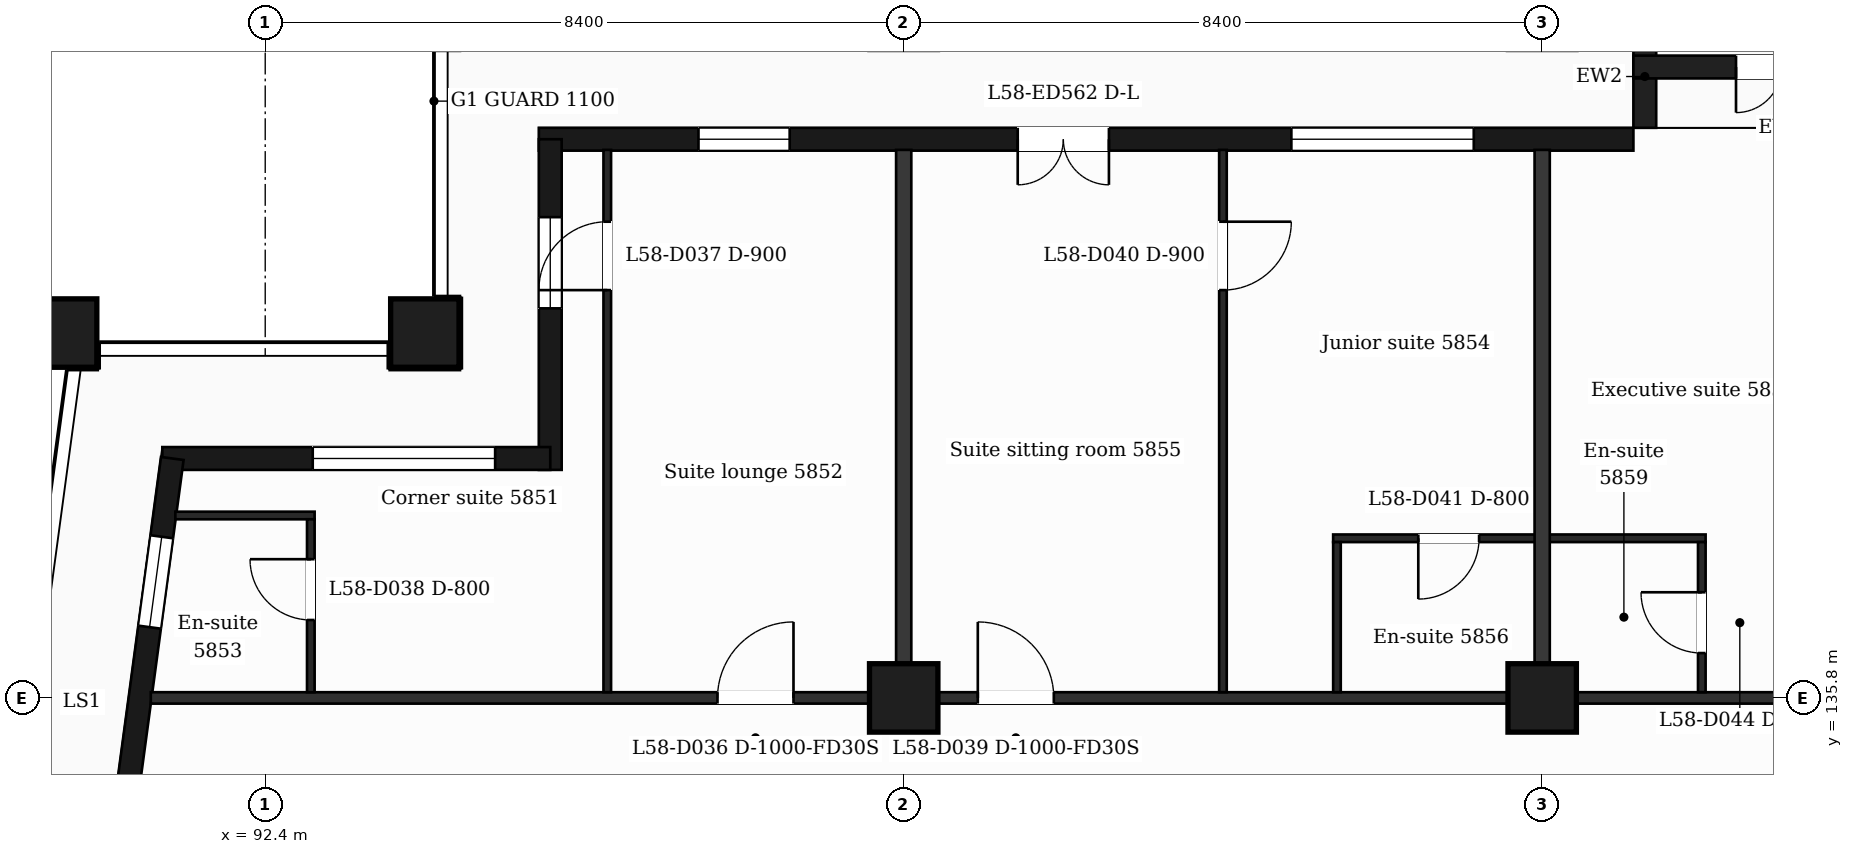
"""IFC4 building model, lengths in metres.
Left out: names, types, materials, properties, quantities, classifications, styles, units other than length and angle.
Written with IfcOpenShell. Run it as: python <this file> out.ifc"""

import sys

from ifc_helpers import new_model, si_unit, direction, frame, frame_2d, origin, origin_2d, place, context, subcontext, project, spatial, rectangle, extrude, element, fill, save


model = new_model("IFC4")
c1 = context("Model", 3, precision=1e-05, world=origin(), true_north=direction((0.0, 1.0)))
c2 = subcontext(c1, "Body", "Model", "MODEL_VIEW")
j1 = project(units=[si_unit("LENGTHUNIT", "METRE"), si_unit("PLANEANGLEUNIT", "RADIAN")], contexts=[c1])
p1 = place(None, origin())
s1 = spatial("IfcSite", under=j1, at=p1, CompositionType="ELEMENT")
p2 = place(p1, origin())
s2 = spatial("IfcBuilding", under=s1, at=p2, CompositionType="ELEMENT")
p3 = place(p2, frame((0.0, 0.0, 239.2)))
s3 = spatial("IfcBuildingStorey", under=s2, at=p3, CompositionType="ELEMENT", Elevation=239.2)
for number, where, z_axis, x_axis in (
    (1, (94.5, 140.6, 0.0), (0.0, 0.0, 1.0), (1.0, 0.0, 0.0)),
    (2, (89.735, 140.6, 0.0), (0.0, 0.0, 1.0), (1.0, 0.0, 0.0)),
    (3, (100.8, 135.8, 0.0), (0.0, 0.0, 1.0), (1.0, 0.0, 0.0)),
    (4, (109.2, 135.8, 0.0), (0.0, 0.0, 1.0), (1.0, 0.0, 0.0)),
):
    element("IfcColumn", number, at=place(p3, frame(where, z_axis=z_axis, x_axis=x_axis)), inside=s3, PredefinedType="COLUMN", context=c2, shape_type="SweptSolid", body=[
        extrude(rectangle(XDim=0.9, YDim=0.9, at=origin_2d()), origin(), (0.0, 0.0, 1.0), 3.7),
    ])
p4 = place(p3, frame((110.4, 143.15, 0.0), z_axis=(0.0, 0.0, 1.0), x_axis=(-1.0, 0.0, 0.0)))
e5 = element("IfcWall", 5, at=p4, inside=s3, PredefinedType="SOLIDWALL", context=c2, shape_type="SweptSolid", body=[
    extrude(rectangle(XDim=14.4, YDim=0.3, at=frame_2d((7.2, 0.0))), origin(), (0.0, 0.0, 1.0), 3.38),
])
p5 = place(p4, frame((2.1, 0.0, 0.9)))
e6 = element("IfcOpeningElement", 6, at=p5, cuts=e5, PredefinedType="OPENING", context=c2, shape_type="SweptSolid", body=[
    extrude(rectangle(XDim=2.4, YDim=2.1, at=frame_2d((1.2, 1.05))), frame((0.0, 0.16, 0.0), z_axis=(0.0, -1.0, 0.0), x_axis=(1.0, 0.0, 0.0)), (0.0, 0.0, 1.0), 0.32),
])
p6 = place(p4, frame((6.9, 0.0, 0.0)))
e7 = element("IfcOpeningElement", 7, at=p6, cuts=e5, PredefinedType="OPENING", context=c2, shape_type="SweptSolid", body=[
    extrude(rectangle(XDim=1.2, YDim=2.4, at=frame_2d((0.6, 1.2))), frame((0.0, 0.16, 0.0), z_axis=(0.0, -1.0, 0.0), x_axis=(1.0, 0.0, 0.0)), (0.0, 0.0, 1.0), 0.32),
])
p7 = place(p4, frame((11.1, 0.0, 0.9)))
e8 = element("IfcOpeningElement", 8, at=p7, cuts=e5, PredefinedType="OPENING", context=c2, shape_type="SweptSolid", body=[
    extrude(rectangle(XDim=1.2, YDim=2.1, at=frame_2d((0.6, 1.05))), frame((0.0, 0.16, 0.0), z_axis=(0.0, -1.0, 0.0), x_axis=(1.0, 0.0, 0.0)), (0.0, 0.0, 1.0), 0.32),
])
p8 = place(p3, frame((110.55, 143.3, 0.0), z_axis=(0.0, 0.0, 1.0), x_axis=(0.0, 1.0, 0.0)))
e9 = element("IfcWall", 9, at=p8, inside=s3, PredefinedType="SOLIDWALL", context=c2, shape_type="SweptSolid", body=[
    extrude(rectangle(XDim=1.35, YDim=0.3, at=frame_2d((0.675, 0.0))), origin(), (0.0, 0.0, 1.0), 3.38),
])
p9 = place(p3, frame((114.3, 144.1, 0.0), z_axis=(0.0, 0.0, 1.0), x_axis=(-1.0, 0.0, 0.0)))
e10 = element("IfcWall", 10, at=p9, inside=s3, PredefinedType="SOLIDWALL", context=c2, shape_type="SweptSolid", body=[
    extrude(rectangle(XDim=3.9, YDim=0.3, at=frame_2d((1.95, 0.0))), origin(), (0.0, 0.0, 1.0), 3.38),
])
p10 = place(p9, frame((1.35, 0.0, 0.0)))
e11 = element("IfcOpeningElement", 11, at=p10, cuts=e10, PredefinedType="OPENING", context=c2, shape_type="SweptSolid", body=[
    extrude(rectangle(XDim=1.2, YDim=2.4, at=frame_2d((0.6, 1.2))), frame((0.0, 0.16, 0.0), z_axis=(0.0, -1.0, 0.0), x_axis=(1.0, 0.0, 0.0)), (0.0, 0.0, 1.0), 0.32),
])
p11 = place(p3, frame((96.15, 143.15, 0.0), z_axis=(0.0, 0.0, 1.0), x_axis=(0.0, -1.0, 0.0)))
e12 = element("IfcWall", 12, at=p11, inside=s3, PredefinedType="SOLIDWALL", context=c2, shape_type="SweptSolid", body=[
    extrude(rectangle(XDim=4.35, YDim=0.3, at=frame_2d((2.175, 0.0))), origin(), (0.0, 0.0, 1.0), 3.38),
])
p12 = place(p11, frame((1.025, 0.0, 0.9)))
e13 = element("IfcOpeningElement", 13, at=p12, cuts=e12, PredefinedType="OPENING", context=c2, shape_type="SweptSolid", body=[
    extrude(rectangle(XDim=1.2, YDim=2.1, at=frame_2d((0.6, 1.05))), frame((0.0, 0.16, 0.0), z_axis=(0.0, -1.0, 0.0), x_axis=(1.0, 0.0, 0.0)), (0.0, 0.0, 1.0), 0.32),
])
p13 = place(p3, frame((96.15, 138.95, 0.0), z_axis=(0.0, 0.0, 1.0), x_axis=(-1.0, 0.0, 0.0)))
e14 = element("IfcWall", 14, at=p13, inside=s3, PredefinedType="SOLIDWALL", context=c2, shape_type="SweptSolid", body=[
    extrude(rectangle(XDim=5.104, YDim=0.3, at=frame_2d((2.552, 0.0))), origin(), (0.0, 0.0, 1.0), 3.38),
])
p14 = place(p13, frame((0.725, 0.0, 0.9)))
e15 = element("IfcOpeningElement", 15, at=p14, cuts=e14, PredefinedType="OPENING", context=c2, shape_type="SweptSolid", body=[
    extrude(rectangle(XDim=2.4, YDim=2.1, at=frame_2d((1.2, 1.05))), frame((0.0, 0.16, 0.0), z_axis=(0.0, -1.0, 0.0), x_axis=(1.0, 0.0, 0.0)), (0.0, 0.0, 1.0), 0.32),
])
p15 = place(p3, frame((91.177, 138.95, 0.0), z_axis=(0.0, 0.0, 1.0), x_axis=(-0.133426664613, -0.991058689065, 0.0)))
e16 = element("IfcWall", 16, at=p15, inside=s3, PredefinedType="SOLIDWALL", context=c2, shape_type="SweptSolid", body=[
    extrude(rectangle(XDim=6.609, YDim=0.3, at=frame_2d((3.305, 0.0))), origin(), (0.0, 0.0, 1.0), 3.38),
])
p16 = place(p15, frame((1.039, 0.0, 0.9)))
e17 = element("IfcOpeningElement", 17, at=p16, cuts=e16, PredefinedType="OPENING", context=c2, shape_type="SweptSolid", body=[
    extrude(rectangle(XDim=1.2, YDim=2.1, at=frame_2d((0.6, 1.05))), frame((0.0, 0.16, 0.0), z_axis=(0.0, -1.0, 0.0), x_axis=(1.0, 0.0, 0.0)), (0.0, 0.0, 1.0), 0.32),
])
p17 = place(p15, frame((4.294, 0.0, 0.0)))
e18 = element("IfcOpeningElement", 18, at=p17, cuts=e16, PredefinedType="OPENING", context=c2, shape_type="SweptSolid", body=[
    extrude(rectangle(XDim=1.2, YDim=2.4, at=frame_2d((0.6, 1.2))), frame((0.0, 0.16, 0.0), z_axis=(0.0, -1.0, 0.0), x_axis=(1.0, 0.0, 0.0)), (0.0, 0.0, 1.0), 0.32),
])
p18 = place(p3, frame((90.895, 135.8, 0.0), z_axis=(0.0, 0.0, 1.0), x_axis=(1.0, 0.0, 0.0)))
e19 = element("IfcWall", 19, at=p18, inside=s3, PredefinedType="PARTITIONING", context=c2, shape_type="SweptSolid", body=[
    extrude(rectangle(XDim=45.011, YDim=0.15, at=frame_2d((22.505, 0.0))), origin(), (0.0, 0.0, 1.0), 3.38),
])
p19 = place(p18, frame((7.455, 0.0, 0.0)))
e20 = element("IfcOpeningElement", 20, at=p19, cuts=e19, PredefinedType="OPENING", context=c2, shape_type="SweptSolid", body=[
    extrude(rectangle(XDim=1.0, YDim=2.1, at=frame_2d((0.5, 1.05))), frame((0.0, 0.085, 0.0), z_axis=(0.0, -1.0, 0.0), x_axis=(1.0, 0.0, 0.0)), (0.0, 0.0, 1.0), 0.17),
])
p20 = place(p18, frame((10.88, 0.0, 0.0)))
e21 = element("IfcOpeningElement", 21, at=p20, cuts=e19, PredefinedType="OPENING", context=c2, shape_type="SweptSolid", body=[
    extrude(rectangle(XDim=1.0, YDim=2.1, at=frame_2d((0.5, 1.05))), frame((0.0, 0.085, 0.0), z_axis=(0.0, -1.0, 0.0), x_axis=(1.0, 0.0, 0.0)), (0.0, 0.0, 1.0), 0.17),
])
p21 = place(p18, frame((27.88, 0.0, 0.0)))
e22 = element("IfcOpeningElement", 22, at=p21, cuts=e19, PredefinedType="OPENING", context=c2, shape_type="SweptSolid", body=[
    extrude(rectangle(XDim=1.0, YDim=2.1, at=frame_2d((0.5, 1.05))), frame((0.0, 0.085, 0.0), z_axis=(0.0, -1.0, 0.0), x_axis=(1.0, 0.0, 0.0)), (0.0, 0.0, 1.0), 0.17),
])
p22 = place(p18, frame((33.168, 0.0, 0.0)))
e23 = element("IfcOpeningElement", 23, at=p22, cuts=e19, PredefinedType="OPENING", context=c2, shape_type="SweptSolid", body=[
    extrude(rectangle(XDim=0.95, YDim=2.1, at=frame_2d((0.475, 1.05))), frame((0.0, 0.085, 0.0), z_axis=(0.0, -1.0, 0.0), x_axis=(1.0, 0.0, 0.0)), (0.0, 0.0, 1.0), 0.17),
])
p23 = place(p18, frame((37.255, 0.0, 0.0)))
e24 = element("IfcOpeningElement", 24, at=p23, cuts=e19, PredefinedType="OPENING", context=c2, shape_type="SweptSolid", body=[
    extrude(rectangle(XDim=1.0, YDim=2.1, at=frame_2d((0.5, 1.05))), frame((0.0, 0.085, 0.0), z_axis=(0.0, -1.0, 0.0), x_axis=(1.0, 0.0, 0.0)), (0.0, 0.0, 1.0), 0.17),
])
p24 = place(p3, frame((106.45, 137.9, 0.0), z_axis=(0.0, 0.0, 1.0), x_axis=(1.0, 0.0, 0.0)))
e25 = element("IfcWall", 25, at=p24, inside=s3, PredefinedType="PARTITIONING", context=c2, shape_type="SweptSolid", body=[
    extrude(rectangle(XDim=4.9, YDim=0.1, at=frame_2d((2.45, 0.0))), origin(), (0.0, 0.0, 1.0), 3.38),
])
p25 = place(p24, frame((1.12, 0.0, 0.0)))
e26 = element("IfcOpeningElement", 26, at=p25, cuts=e25, PredefinedType="OPENING", context=c2, shape_type="SweptSolid", body=[
    extrude(rectangle(XDim=0.8, YDim=2.1, at=frame_2d((0.4, 1.05))), frame((0.0, 0.06, 0.0), z_axis=(0.0, -1.0, 0.0), x_axis=(1.0, 0.0, 0.0)), (0.0, 0.0, 1.0), 0.12),
])
p26 = place(p3, frame((91.218, 138.2, 0.0), z_axis=(0.0, 0.0, 1.0), x_axis=(1.0, 0.0, 0.0)))
e27 = element("IfcWall", 27, at=p26, inside=s3, PredefinedType="PARTITIONING", context=c2, shape_type="SweptSolid", body=[
    extrude(rectangle(XDim=1.832, YDim=0.1, at=frame_2d((0.916, 0.0))), origin(), (0.0, 0.0, 1.0), 3.38),
])
p27 = place(p3, frame((93.0, 135.875, 0.0), z_axis=(0.0, 0.0, 1.0), x_axis=(0.0, 1.0, 0.0)))
e28 = element("IfcWall", 28, at=p27, inside=s3, PredefinedType="PARTITIONING", context=c2, shape_type="SweptSolid", body=[
    extrude(rectangle(XDim=2.275, YDim=0.1, at=frame_2d((1.137, 0.0))), origin(), (0.0, 0.0, 1.0), 3.38),
])
p28 = place(p27, frame((0.95, 0.0, 0.0)))
e29 = element("IfcOpeningElement", 29, at=p28, cuts=e28, PredefinedType="OPENING", context=c2, shape_type="SweptSolid", body=[
    extrude(rectangle(XDim=0.8, YDim=2.1, at=frame_2d((0.4, 1.05))), frame((0.0, 0.06, 0.0), z_axis=(0.0, -1.0, 0.0), x_axis=(1.0, 0.0, 0.0)), (0.0, 0.0, 1.0), 0.12),
])
p29 = place(p3, frame((96.9, 135.875, 0.0), z_axis=(0.0, 0.0, 1.0), x_axis=(0.0, 1.0, 0.0)))
e30 = element("IfcWall", 30, at=p29, inside=s3, PredefinedType="PARTITIONING", context=c2, shape_type="SweptSolid", body=[
    extrude(rectangle(XDim=7.135, YDim=0.1, at=frame_2d((3.567, 0.0))), origin(), (0.0, 0.0, 1.0), 3.38),
])
p30 = place(p29, frame((5.29, 0.0, 0.0)))
e31 = element("IfcOpeningElement", 31, at=p30, cuts=e30, PredefinedType="OPENING", context=c2, shape_type="SweptSolid", body=[
    extrude(rectangle(XDim=0.9, YDim=2.1, at=frame_2d((0.45, 1.05))), frame((0.0, 0.06, 0.0), z_axis=(0.0, -1.0, 0.0), x_axis=(1.0, 0.0, 0.0)), (0.0, 0.0, 1.0), 0.12),
])
p31 = place(p3, frame((100.8, 135.875, 0.0), z_axis=(0.0, 0.0, 1.0), x_axis=(0.0, 1.0, 0.0)))
e32 = element("IfcWall", 32, at=p31, inside=s3, PredefinedType="PARTITIONING", context=c2, shape_type="SweptSolid", body=[
    extrude(rectangle(XDim=7.135, YDim=0.2, at=frame_2d((3.567, 0.0))), origin(), (0.0, 0.0, 1.0), 3.38),
])
p32 = place(p3, frame((105.0, 135.875, 0.0), z_axis=(0.0, 0.0, 1.0), x_axis=(0.0, 1.0, 0.0)))
e33 = element("IfcWall", 33, at=p32, inside=s3, PredefinedType="PARTITIONING", context=c2, shape_type="SweptSolid", body=[
    extrude(rectangle(XDim=7.135, YDim=0.1, at=frame_2d((3.567, 0.0))), origin(), (0.0, 0.0, 1.0), 3.38),
])
p33 = place(p32, frame((5.29, 0.0, 0.0)))
e34 = element("IfcOpeningElement", 34, at=p33, cuts=e33, PredefinedType="OPENING", context=c2, shape_type="SweptSolid", body=[
    extrude(rectangle(XDim=0.9, YDim=2.1, at=frame_2d((0.45, 1.05))), frame((0.0, 0.06, 0.0), z_axis=(0.0, -1.0, 0.0), x_axis=(1.0, 0.0, 0.0)), (0.0, 0.0, 1.0), 0.12),
])
p34 = place(p3, frame((106.5, 135.875, 0.0), z_axis=(0.0, 0.0, 1.0), x_axis=(0.0, 1.0, 0.0)))
e35 = element("IfcWall", 35, at=p34, inside=s3, PredefinedType="PARTITIONING", context=c2, shape_type="SweptSolid", body=[
    extrude(rectangle(XDim=1.975, YDim=0.1, at=frame_2d((0.988, 0.0))), origin(), (0.0, 0.0, 1.0), 3.38),
])
p35 = place(p3, frame((109.2, 135.875, 0.0), z_axis=(0.0, 0.0, 1.0), x_axis=(0.0, 1.0, 0.0)))
e36 = element("IfcWall", 36, at=p35, inside=s3, PredefinedType="PARTITIONING", context=c2, shape_type="SweptSolid", body=[
    extrude(rectangle(XDim=7.135, YDim=0.2, at=frame_2d((3.567, 0.0))), origin(), (0.0, 0.0, 1.0), 3.38),
])
p36 = place(p3, frame((111.3, 135.875, 0.0), z_axis=(0.0, 0.0, 1.0), x_axis=(0.0, 1.0, 0.0)))
e37 = element("IfcWall", 37, at=p36, inside=s3, PredefinedType="PARTITIONING", context=c2, shape_type="SweptSolid", body=[
    extrude(rectangle(XDim=1.975, YDim=0.1, at=frame_2d((0.988, 0.0))), origin(), (0.0, 0.0, 1.0), 3.38),
])
p37 = place(p36, frame((0.515, 0.0, 0.0)))
e38 = element("IfcOpeningElement", 38, at=p37, cuts=e37, PredefinedType="OPENING", context=c2, shape_type="SweptSolid", body=[
    extrude(rectangle(XDim=0.8, YDim=2.1, at=frame_2d((0.4, 1.05))), frame((0.0, 0.06, 0.0), z_axis=(0.0, -1.0, 0.0), x_axis=(1.0, 0.0, 0.0)), (0.0, 0.0, 1.0), 0.12),
])
p38 = place(p5, origin())
e39 = element("IfcWindow", 39, at=p38, inside=s3, PartitioningType="SINGLE_PANEL", PredefinedType="WINDOW", context=c2, shape_type="SweptSolid", body=[
    extrude(rectangle(XDim=2.4, YDim=2.1, at=frame_2d((1.2, 1.05))), frame((0.0, 0.03, 0.0), z_axis=(0.0, -1.0, 0.0), x_axis=(1.0, 0.0, 0.0)), (0.0, 0.0, 1.0), 0.06),
])
fill(e6, e39)
p39 = place(p6, origin())
e40 = element("IfcDoor", 40, at=p39, inside=s3, OperationType="DOUBLE_DOOR_SINGLE_SWING", PredefinedType="DOOR", context=c2, shape_type="SweptSolid", body=[
    extrude(rectangle(XDim=1.2, YDim=2.4, at=frame_2d((0.6, 1.2))), frame((0.0, 0.025, 0.0), z_axis=(0.0, -1.0, 0.0), x_axis=(1.0, 0.0, 0.0)), (0.0, 0.0, 1.0), 0.05),
])
fill(e7, e40)
p40 = place(p7, origin())
e41 = element("IfcWindow", 41, at=p40, inside=s3, PartitioningType="SINGLE_PANEL", PredefinedType="WINDOW", context=c2, shape_type="SweptSolid", body=[
    extrude(rectangle(XDim=1.2, YDim=2.1, at=frame_2d((0.6, 1.05))), frame((0.0, 0.03, 0.0), z_axis=(0.0, -1.0, 0.0), x_axis=(1.0, 0.0, 0.0)), (0.0, 0.0, 1.0), 0.06),
])
fill(e8, e41)
p41 = place(p10, origin())
e42 = element("IfcDoor", 42, at=p41, inside=s3, OperationType="DOUBLE_DOOR_SINGLE_SWING", PredefinedType="DOOR", context=c2, shape_type="SweptSolid", body=[
    extrude(rectangle(XDim=1.2, YDim=2.4, at=frame_2d((0.6, 1.2))), frame((0.0, 0.025, 0.0), z_axis=(0.0, -1.0, 0.0), x_axis=(1.0, 0.0, 0.0)), (0.0, 0.0, 1.0), 0.05),
])
fill(e11, e42)
p42 = place(p12, origin())
e43 = element("IfcWindow", 43, at=p42, inside=s3, PartitioningType="SINGLE_PANEL", PredefinedType="WINDOW", context=c2, shape_type="SweptSolid", body=[
    extrude(rectangle(XDim=1.2, YDim=2.1, at=frame_2d((0.6, 1.05))), frame((0.0, 0.03, 0.0), z_axis=(0.0, -1.0, 0.0), x_axis=(1.0, 0.0, 0.0)), (0.0, 0.0, 1.0), 0.06),
])
fill(e13, e43)
p43 = place(p14, origin())
e44 = element("IfcWindow", 44, at=p43, inside=s3, PartitioningType="SINGLE_PANEL", PredefinedType="WINDOW", context=c2, shape_type="SweptSolid", body=[
    extrude(rectangle(XDim=2.4, YDim=2.1, at=frame_2d((1.2, 1.05))), frame((0.0, 0.03, 0.0), z_axis=(0.0, -1.0, 0.0), x_axis=(1.0, 0.0, 0.0)), (0.0, 0.0, 1.0), 0.06),
])
fill(e15, e44)
p44 = place(p16, origin())
e45 = element("IfcWindow", 45, at=p44, inside=s3, PartitioningType="SINGLE_PANEL", PredefinedType="WINDOW", context=c2, shape_type="SweptSolid", body=[
    extrude(rectangle(XDim=1.2, YDim=2.1, at=frame_2d((0.6, 1.05))), frame((0.0, 0.03, 0.0), z_axis=(0.0, -1.0, 0.0), x_axis=(1.0, 0.0, 0.0)), (0.0, 0.0, 1.0), 0.06),
])
fill(e17, e45)
p45 = place(p19, origin())
e46 = element("IfcDoor", 46, at=p45, inside=s3, OperationType="SINGLE_SWING_RIGHT", PredefinedType="DOOR", context=c2, shape_type="SweptSolid", body=[
    extrude(rectangle(XDim=1.0, YDim=2.1, at=frame_2d((0.5, 1.05))), frame((0.0, 0.025, 0.0), z_axis=(0.0, -1.0, 0.0), x_axis=(1.0, 0.0, 0.0)), (0.0, 0.0, 1.0), 0.05),
])
fill(e20, e46)
p46 = place(p30, origin())
e47 = element("IfcDoor", 47, at=p46, inside=s3, OperationType="SINGLE_SWING_LEFT", PredefinedType="DOOR", context=c2, shape_type="SweptSolid", body=[
    extrude(rectangle(XDim=0.9, YDim=2.1, at=frame_2d((0.45, 1.05))), frame((0.0, 0.025, 0.0), z_axis=(0.0, -1.0, 0.0), x_axis=(1.0, 0.0, 0.0)), (0.0, 0.0, 1.0), 0.05),
])
fill(e31, e47)
p47 = place(p28, origin())
e48 = element("IfcDoor", 48, at=p47, inside=s3, OperationType="SINGLE_SWING_RIGHT", PredefinedType="DOOR", context=c2, shape_type="SweptSolid", body=[
    extrude(rectangle(XDim=0.8, YDim=2.1, at=frame_2d((0.4, 1.05))), frame((0.0, 0.025, 0.0), z_axis=(0.0, -1.0, 0.0), x_axis=(1.0, 0.0, 0.0)), (0.0, 0.0, 1.0), 0.05),
])
fill(e29, e48)
p48 = place(p20, origin())
e49 = element("IfcDoor", 49, at=p48, inside=s3, OperationType="SINGLE_SWING_LEFT", PredefinedType="DOOR", context=c2, shape_type="SweptSolid", body=[
    extrude(rectangle(XDim=1.0, YDim=2.1, at=frame_2d((0.5, 1.05))), frame((0.0, 0.025, 0.0), z_axis=(0.0, -1.0, 0.0), x_axis=(1.0, 0.0, 0.0)), (0.0, 0.0, 1.0), 0.05),
])
fill(e21, e49)
p49 = place(p33, origin())
e50 = element("IfcDoor", 50, at=p49, inside=s3, OperationType="SINGLE_SWING_RIGHT", PredefinedType="DOOR", context=c2, shape_type="SweptSolid", body=[
    extrude(rectangle(XDim=0.9, YDim=2.1, at=frame_2d((0.45, 1.05))), frame((0.0, 0.025, 0.0), z_axis=(0.0, -1.0, 0.0), x_axis=(1.0, 0.0, 0.0)), (0.0, 0.0, 1.0), 0.05),
])
fill(e34, e50)
p50 = place(p25, origin())
e51 = element("IfcDoor", 51, at=p50, inside=s3, OperationType="SINGLE_SWING_LEFT", PredefinedType="DOOR", context=c2, shape_type="SweptSolid", body=[
    extrude(rectangle(XDim=0.8, YDim=2.1, at=frame_2d((0.4, 1.05))), frame((0.0, 0.025, 0.0), z_axis=(0.0, -1.0, 0.0), x_axis=(1.0, 0.0, 0.0)), (0.0, 0.0, 1.0), 0.05),
])
fill(e26, e51)
p51 = place(p37, origin())
e52 = element("IfcDoor", 52, at=p51, inside=s3, OperationType="SINGLE_SWING_RIGHT", PredefinedType="DOOR", context=c2, shape_type="SweptSolid", body=[
    extrude(rectangle(XDim=0.8, YDim=2.1, at=frame_2d((0.4, 1.05))), frame((0.0, 0.025, 0.0), z_axis=(0.0, -1.0, 0.0), x_axis=(1.0, 0.0, 0.0)), (0.0, 0.0, 1.0), 0.05),
])
fill(e38, e52)
save(model, sys.argv[1])
